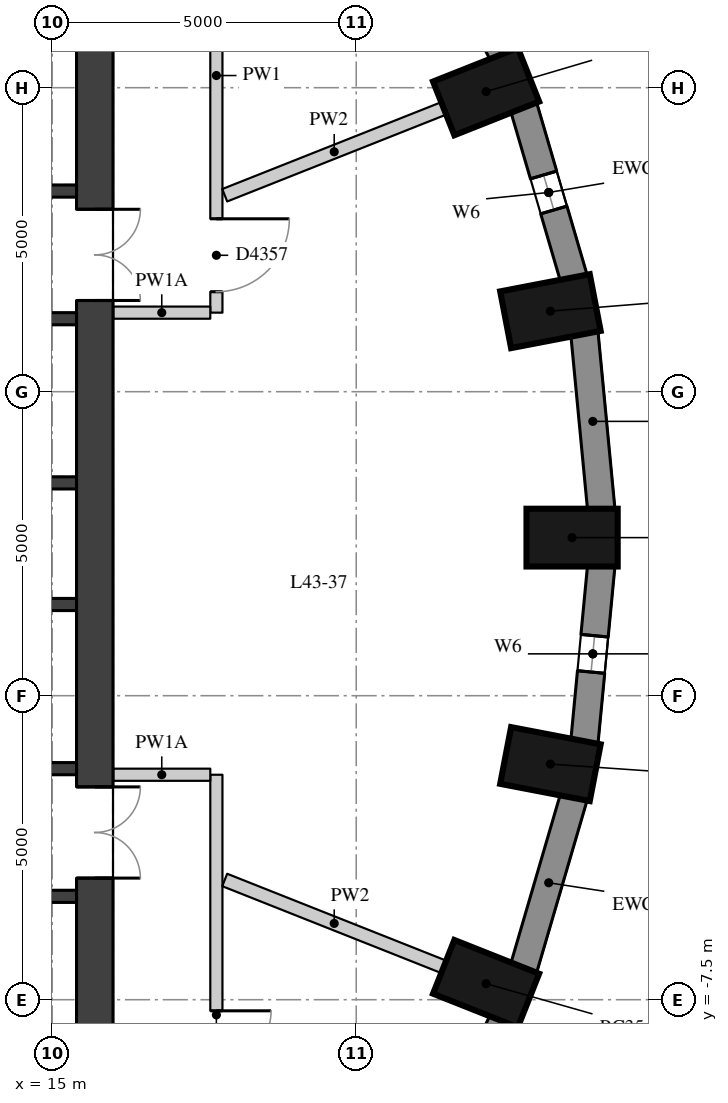
"""IFC4 building model, lengths in metres.
Left out: names, types, materials, properties, quantities, classifications, styles, units other than length and angle.
Written with IfcOpenShell. Run it as: python <this file> out.ifc"""

import sys

from ifc_helpers import new_model, si_unit, direction, frame, frame_2d, origin, origin_2d, place, context, subcontext, project, spatial, rectangle, extrude, element, fill, save


model = new_model("IFC4")
c1 = context("Model", 3, precision=1e-05, world=origin(), true_north=direction((0.0, 1.0)))
c2 = subcontext(c1, "Body", "Model", "MODEL_VIEW")
j1 = project(units=[si_unit("LENGTHUNIT", "METRE"), si_unit("PLANEANGLEUNIT", "RADIAN")], contexts=[c1])
p1 = place(None, origin())
s1 = spatial("IfcSite", under=j1, at=p1, CompositionType="ELEMENT")
p2 = place(p1, origin())
s2 = spatial("IfcBuilding", under=s1, at=p2, CompositionType="ELEMENT")
p3 = place(p2, frame((0.0, 0.0, 155.0)))
s3 = spatial("IfcBuildingStorey", under=s2, at=p3, CompositionType="ELEMENT", Elevation=155.0)
for number, where, z_axis, x_axis in (
    (1, (23.55, 0.1, 0.0), (0.0, 0.0, 1.0), (1.0, 0.0, 0.0)),
    (2, (23.194, 3.825, 0.0), (0.0, 0.0, 1.0), (0.982, 0.189, 0.0)),
    (3, (22.136, 7.436, 0.0), (0.0, 0.0, 1.0), (0.93, 0.369, 0.0)),
    (4, (22.136, -7.236, 0.0), (0.0, 0.0, 1.0), (0.93, -0.369, 0.0)),
    (5, (23.194, -3.625, 0.0), (0.0, 0.0, 1.0), (0.982, -0.189, 0.0)),
):
    element("IfcColumn", number, at=place(p3, frame(where, z_axis=z_axis, x_axis=x_axis)), inside=s3, PredefinedType="COLUMN", context=c2, shape_type="SweptSolid", body=[
        extrude(rectangle(XDim=1.5, YDim=0.95, at=origin_2d()), origin(), (0.0, 0.0, 1.0), 3.3),
    ])
p4 = place(p3, frame((24.031, 0.555, 0.0), z_axis=(0.0, 0.0, 1.0), x_axis=(-0.095265737322, 0.995451876935, 0.0)))
e6 = element("IfcWall", 6, at=p4, inside=s3, PredefinedType="SOLIDWALL", context=c2, shape_type="SweptSolid", body=[
    extrude(rectangle(XDim=2.927, YDim=0.45, at=frame_2d((1.463, 0.0))), origin(), (0.0, 0.0, 1.0), 3.02),
])
p5 = place(p3, frame((23.58, 4.362, 0.0), z_axis=(0.0, 0.0, 1.0), x_axis=(-0.281049481624, 0.959693278542, 0.0)))
e7 = element("IfcWall", 7, at=p5, inside=s3, PredefinedType="SOLIDWALL", context=c2, shape_type="SweptSolid", body=[
    extrude(rectangle(XDim=2.948, YDim=0.45, at=frame_2d((1.474, 0.0))), origin(), (0.0, 0.0, 1.0), 3.02),
])
p6 = place(p5, frame((1.174, 0.0, 0.4)))
e8 = element("IfcOpeningElement", 8, at=p6, cuts=e7, PredefinedType="OPENING", context=c2, shape_type="SweptSolid", body=[
    extrude(rectangle(XDim=0.6, YDim=1.75, at=frame_2d((0.3, 0.875))), frame((0.0, 0.235, 0.0), z_axis=(0.0, -1.0, 0.0), x_axis=(1.0, 0.0, 0.0)), (0.0, 0.0, 1.0), 0.47),
])
p7 = place(p3, frame((22.415, 8.037, 0.0), z_axis=(0.0, 0.0, 1.0), x_axis=(-0.454133999889, 0.890933392653, 0.0)))
e9 = element("IfcWall", 9, at=p7, inside=s3, PredefinedType="SOLIDWALL", context=c2, shape_type="SweptSolid", body=[
    extrude(rectangle(XDim=2.986, YDim=0.45, at=frame_2d((1.493, 0.0))), origin(), (0.0, 0.0, 1.0), 3.02),
])
p8 = place(p3, frame((21.059, -10.497, 0.0), z_axis=(0.0, 0.0, 1.0), x_axis=(0.454133999889, 0.890933392653, 0.0)))
e10 = element("IfcWall", 10, at=p8, inside=s3, PredefinedType="SOLIDWALL", context=c2, shape_type="SweptSolid", body=[
    extrude(rectangle(XDim=2.986, YDim=0.45, at=frame_2d((1.493, 0.0))), origin(), (0.0, 0.0, 1.0), 3.02),
])
p9 = place(p8, frame((1.193, 0.0, 0.4)))
e11 = element("IfcOpeningElement", 11, at=p9, cuts=e10, PredefinedType="OPENING", context=c2, shape_type="SweptSolid", body=[
    extrude(rectangle(XDim=0.6, YDim=1.75, at=frame_2d((0.3, 0.875))), frame((0.0, 0.235, 0.0), z_axis=(0.0, -1.0, 0.0), x_axis=(1.0, 0.0, 0.0)), (0.0, 0.0, 1.0), 0.47),
])
p10 = place(p3, frame((22.751, -6.991, 0.0), z_axis=(0.0, 0.0, 1.0), x_axis=(0.281049481624, 0.959693278542, 0.0)))
e12 = element("IfcWall", 12, at=p10, inside=s3, PredefinedType="SOLIDWALL", context=c2, shape_type="SweptSolid", body=[
    extrude(rectangle(XDim=2.948, YDim=0.45, at=frame_2d((1.474, 0.0))), origin(), (0.0, 0.0, 1.0), 3.02),
])
p11 = place(p3, frame((23.752, -3.269, 0.0), z_axis=(0.0, 0.0, 1.0), x_axis=(0.095257827044, 0.995452633924, 0.0)))
e13 = element("IfcWall", 13, at=p11, inside=s3, PredefinedType="SOLIDWALL", context=c2, shape_type="SweptSolid", body=[
    extrude(rectangle(XDim=2.927, YDim=0.45, at=frame_2d((1.463, 0.0))), origin(), (0.0, 0.0, 1.0), 3.02),
])
p12 = place(p11, frame((1.163, 0.0, 0.4)))
e14 = element("IfcOpeningElement", 14, at=p12, cuts=e13, PredefinedType="OPENING", context=c2, shape_type="SweptSolid", body=[
    extrude(rectangle(XDim=0.6, YDim=1.75, at=frame_2d((0.3, 0.875))), frame((0.0, 0.235, 0.0), z_axis=(0.0, -1.0, 0.0), x_axis=(1.0, 0.0, 0.0)), (0.0, 0.0, 1.0), 0.47),
])
p13 = place(p3, frame((15.7, -9.4, 0.0), z_axis=(0.0, 0.0, 1.0), x_axis=(0.0, 1.0, 0.0)))
e15 = element("IfcWall", 15, at=p13, inside=s3, PredefinedType="SHEAR", context=c2, shape_type="SweptSolid", body=[
    extrude(rectangle(XDim=18.8, YDim=0.6, at=frame_2d((9.4, 0.0))), origin(), (0.0, 0.0, 1.0), 3.02),
])
p14 = place(p13, frame((13.4, 0.0, 0.0)))
e16 = element("IfcOpeningElement", 16, at=p14, cuts=e15, PredefinedType="OPENING", context=c2, shape_type="SweptSolid", body=[
    extrude(rectangle(XDim=1.5, YDim=2.1, at=frame_2d((0.75, 1.05))), frame((0.0, 0.31, 0.0), z_axis=(0.0, -1.0, 0.0), x_axis=(1.0, 0.0, 0.0)), (0.0, 0.0, 1.0), 0.62),
])
p15 = place(p13, frame((3.9, 0.0, 0.0)))
e17 = element("IfcOpeningElement", 17, at=p15, cuts=e15, PredefinedType="OPENING", context=c2, shape_type="SweptSolid", body=[
    extrude(rectangle(XDim=1.5, YDim=2.1, at=frame_2d((0.75, 1.05))), frame((0.0, 0.31, 0.0), z_axis=(0.0, -1.0, 0.0), x_axis=(1.0, 0.0, 0.0)), (0.0, 0.0, 1.0), 0.62),
])
p16 = place(p3, frame((4.6, 5.8, 0.0), z_axis=(0.0, 0.0, 1.0), x_axis=(1.0, 0.0, 0.0)))
e18 = element("IfcWall", 18, at=p16, inside=s3, PredefinedType="SHEAR", context=c2, shape_type="SweptSolid", body=[
    extrude(rectangle(XDim=10.8, YDim=0.2, at=frame_2d((5.4, 0.0))), origin(), (0.0, 0.0, 1.0), 3.02),
])
p17 = place(p16, frame((7.05, 0.0, 0.0)))
e19 = element("IfcOpeningElement", 19, at=p17, cuts=e18, PredefinedType="OPENING", context=c2, shape_type="SweptSolid", body=[
    extrude(rectangle(XDim=1.1, YDim=2.1, at=frame_2d((0.55, 1.05))), frame((0.0, 0.11, 0.0), z_axis=(0.0, -1.0, 0.0), x_axis=(1.0, 0.0, 0.0)), (0.0, 0.0, 1.0), 0.22),
])
p18 = place(p16, frame((9.05, 0.0, 0.0)))
e20 = element("IfcOpeningElement", 20, at=p18, cuts=e18, PredefinedType="OPENING", context=c2, shape_type="SweptSolid", body=[
    extrude(rectangle(XDim=1.1, YDim=2.1, at=frame_2d((0.55, 1.05))), frame((0.0, 0.11, 0.0), z_axis=(0.0, -1.0, 0.0), x_axis=(1.0, 0.0, 0.0)), (0.0, 0.0, 1.0), 0.22),
])
p19 = place(p3, frame((4.6, 3.7, 0.0), z_axis=(0.0, 0.0, 1.0), x_axis=(1.0, 0.0, 0.0)))
e21 = element("IfcWall", 21, at=p19, inside=s3, PredefinedType="SHEAR", context=c2, shape_type="SweptSolid", body=[
    extrude(rectangle(XDim=10.8, YDim=0.2, at=frame_2d((5.4, 0.0))), origin(), (0.0, 0.0, 1.0), 3.02),
])
p20 = place(p19, frame((6.6, 0.0, 0.0)))
e22 = element("IfcOpeningElement", 22, at=p20, cuts=e21, PredefinedType="OPENING", context=c2, shape_type="SweptSolid", body=[
    extrude(rectangle(XDim=1.1, YDim=2.1, at=frame_2d((0.55, 1.05))), frame((0.0, 0.11, 0.0), z_axis=(0.0, -1.0, 0.0), x_axis=(1.0, 0.0, 0.0)), (0.0, 0.0, 1.0), 0.22),
])
p21 = place(p19, frame((8.9, 0.0, 0.0)))
e23 = element("IfcOpeningElement", 23, at=p21, cuts=e21, PredefinedType="OPENING", context=c2, shape_type="SweptSolid", body=[
    extrude(rectangle(XDim=1.1, YDim=2.1, at=frame_2d((0.55, 1.05))), frame((0.0, 0.11, 0.0), z_axis=(0.0, -1.0, 0.0), x_axis=(1.0, 0.0, 0.0)), (0.0, 0.0, 1.0), 0.22),
])
for number, where, z_axis, x_axis in (
    (24, (4.6, 1.0, 0.0), (0.0, 0.0, 1.0), (1.0, 0.0, 0.0)),
    (25, (4.6, -1.0, 0.0), (0.0, 0.0, 1.0), (1.0, 0.0, 0.0)),
):
    element("IfcWall", number, at=place(p3, frame(where, z_axis=z_axis, x_axis=x_axis)), inside=s3, PredefinedType="SHEAR", context=c2, shape_type="SweptSolid", body=[
        extrude(rectangle(XDim=10.8, YDim=0.2, at=frame_2d((5.4, 0.0))), origin(), (0.0, 0.0, 1.0), 3.02),
    ])
p22 = place(p3, frame((4.6, -3.7, 0.0), z_axis=(0.0, 0.0, 1.0), x_axis=(1.0, 0.0, 0.0)))
e26 = element("IfcWall", 26, at=p22, inside=s3, PredefinedType="SHEAR", context=c2, shape_type="SweptSolid", body=[
    extrude(rectangle(XDim=10.8, YDim=0.2, at=frame_2d((5.4, 0.0))), origin(), (0.0, 0.0, 1.0), 3.02),
])
p23 = place(p22, frame((6.6, 0.0, 0.0)))
e27 = element("IfcOpeningElement", 27, at=p23, cuts=e26, PredefinedType="OPENING", context=c2, shape_type="SweptSolid", body=[
    extrude(rectangle(XDim=1.1, YDim=2.1, at=frame_2d((0.55, 1.05))), frame((0.0, 0.11, 0.0), z_axis=(0.0, -1.0, 0.0), x_axis=(1.0, 0.0, 0.0)), (0.0, 0.0, 1.0), 0.22),
])
p24 = place(p22, frame((8.9, 0.0, 0.0)))
e28 = element("IfcOpeningElement", 28, at=p24, cuts=e26, PredefinedType="OPENING", context=c2, shape_type="SweptSolid", body=[
    extrude(rectangle(XDim=1.1, YDim=2.1, at=frame_2d((0.55, 1.05))), frame((0.0, 0.11, 0.0), z_axis=(0.0, -1.0, 0.0), x_axis=(1.0, 0.0, 0.0)), (0.0, 0.0, 1.0), 0.22),
])
p25 = place(p3, frame((4.6, -5.8, 0.0), z_axis=(0.0, 0.0, 1.0), x_axis=(1.0, 0.0, 0.0)))
e29 = element("IfcWall", 29, at=p25, inside=s3, PredefinedType="SHEAR", context=c2, shape_type="SweptSolid", body=[
    extrude(rectangle(XDim=10.8, YDim=0.2, at=frame_2d((5.4, 0.0))), origin(), (0.0, 0.0, 1.0), 3.02),
])
p26 = place(p3, frame((17.7, -3.8, 0.0), z_axis=(0.0, 0.0, 1.0), x_axis=(0.0, -1.0, 0.0)))
e30 = element("IfcWall", 30, at=p26, inside=s3, PredefinedType="PARTITIONING", context=c2, shape_type="SweptSolid", body=[
    extrude(rectangle(XDim=7.9, YDim=0.2, at=frame_2d((3.95, 0.0))), origin(), (0.0, 0.0, 1.0), 3.02),
])
p27 = place(p26, frame((3.883, 0.0, 0.0)))
e31 = element("IfcOpeningElement", 31, at=p27, cuts=e30, PredefinedType="OPENING", context=c2, shape_type="SweptSolid", body=[
    extrude(rectangle(XDim=1.8, YDim=2.1, at=frame_2d((0.9, 1.05))), frame((0.0, 0.11, 0.0), z_axis=(0.0, -1.0, 0.0), x_axis=(1.0, 0.0, 0.0)), (0.0, 0.0, 1.0), 0.22),
])
p28 = place(p3, frame((17.7, 11.6, 0.0), z_axis=(0.0, 0.0, 1.0), x_axis=(0.0, -1.0, 0.0)))
e32 = element("IfcWall", 32, at=p28, inside=s3, PredefinedType="PARTITIONING", context=c2, shape_type="SweptSolid", body=[
    extrude(rectangle(XDim=7.8, YDim=0.2, at=frame_2d((3.9, 0.0))), origin(), (0.0, 0.0, 1.0), 3.02),
])
p29 = place(p28, frame((6.256, 0.0, 0.0)))
e33 = element("IfcOpeningElement", 33, at=p29, cuts=e32, PredefinedType="OPENING", context=c2, shape_type="SweptSolid", body=[
    extrude(rectangle(XDim=1.2, YDim=2.1, at=frame_2d((0.6, 1.05))), frame((0.0, 0.11, 0.0), z_axis=(0.0, -1.0, 0.0), x_axis=(1.0, 0.0, 0.0)), (0.0, 0.0, 1.0), 0.22),
])
for number, where, z_axis, x_axis in (
    (34, (17.6, 3.8, 0.0), (0.0, 0.0, 1.0), (-1.0, 0.0, 0.0)),
    (35, (16.004, -3.8, 0.0), (0.0, 0.0, 1.0), (1.0, 0.0, 0.0)),
):
    element("IfcWall", number, at=place(p3, frame(where, z_axis=z_axis, x_axis=x_axis)), inside=s3, PredefinedType="PARTITIONING", context=c2, shape_type="SweptSolid", body=[
        extrude(rectangle(XDim=1.596, YDim=0.2, at=frame_2d((0.798, 0.0))), origin(), (0.0, 0.0, 1.0), 2.57),
    ])
for number, where, z_axis, x_axis in (
    (36, (21.439, 7.16, 0.0), (0.0, 0.0, 1.0), (-0.93, -0.369, 0.0)),
    (37, (21.439, -6.96, 0.0), (0.0, 0.0, 1.0), (-0.93, 0.369, 0.0)),
):
    element("IfcWall", number, at=place(p3, frame(where, z_axis=z_axis, x_axis=x_axis)), inside=s3, PredefinedType="PARTITIONING", context=c2, shape_type="SweptSolid", body=[
        extrude(rectangle(XDim=3.875, YDim=0.22, at=frame_2d((1.938, 0.0))), origin(), (0.0, 0.0, 1.0), 3.02),
    ])
p30 = place(p6, origin())
e38 = element("IfcWindow", 38, at=p30, inside=s3, PartitioningType="SINGLE_PANEL", PredefinedType="WINDOW", context=c2, shape_type="SweptSolid", body=[
    extrude(rectangle(XDim=0.6, YDim=1.75, at=frame_2d((0.3, 0.875))), frame((0.0, 0.035, 0.0), z_axis=(0.0, -1.0, 0.0), x_axis=(1.0, 0.0, 0.0)), (0.0, 0.0, 1.0), 0.06),
])
fill(e8, e38)
p31 = place(p12, origin())
e39 = element("IfcWindow", 39, at=p31, inside=s3, PartitioningType="SINGLE_PANEL", PredefinedType="WINDOW", context=c2, shape_type="SweptSolid", body=[
    extrude(rectangle(XDim=0.6, YDim=1.75, at=frame_2d((0.3, 0.875))), frame((0.0, 0.035, 0.0), z_axis=(0.0, -1.0, 0.0), x_axis=(1.0, 0.0, 0.0)), (0.0, 0.0, 1.0), 0.06),
])
fill(e14, e39)
p32 = place(p14, origin())
e40 = element("IfcDoor", 40, at=p32, inside=s3, OperationType="DOUBLE_DOOR_SINGLE_SWING", PredefinedType="DOOR", context=c2, shape_type="SweptSolid", body=[
    extrude(rectangle(XDim=1.5, YDim=2.1, at=frame_2d((0.75, 1.05))), frame((0.0, 0.025, 0.0), z_axis=(0.0, -1.0, 0.0), x_axis=(1.0, 0.0, 0.0)), (0.0, 0.0, 1.0), 0.05),
])
fill(e16, e40)
p33 = place(p15, origin())
e41 = element("IfcDoor", 41, at=p33, inside=s3, OperationType="DOUBLE_DOOR_SINGLE_SWING", PredefinedType="DOOR", context=c2, shape_type="SweptSolid", body=[
    extrude(rectangle(XDim=1.5, YDim=2.1, at=frame_2d((0.75, 1.05))), frame((0.0, 0.025, 0.0), z_axis=(0.0, -1.0, 0.0), x_axis=(1.0, 0.0, 0.0)), (0.0, 0.0, 1.0), 0.05),
])
fill(e17, e41)
p34 = place(p27, origin())
e42 = element("IfcDoor", 42, at=p34, inside=s3, OperationType="DOUBLE_DOOR_SINGLE_SWING", PredefinedType="DOOR", context=c2, shape_type="SweptSolid", body=[
    extrude(rectangle(XDim=1.8, YDim=2.1, at=frame_2d((0.9, 1.05))), frame((0.0, 0.025, 0.0), z_axis=(0.0, -1.0, 0.0), x_axis=(1.0, 0.0, 0.0)), (0.0, 0.0, 1.0), 0.05),
])
fill(e31, e42)
p35 = place(p29, origin())
e43 = element("IfcDoor", 43, at=p35, inside=s3, OperationType="SINGLE_SWING_LEFT", PredefinedType="DOOR", context=c2, shape_type="SweptSolid", body=[
    extrude(rectangle(XDim=1.2, YDim=2.1, at=frame_2d((0.6, 1.05))), frame((0.0, 0.025, 0.0), z_axis=(0.0, -1.0, 0.0), x_axis=(1.0, 0.0, 0.0)), (0.0, 0.0, 1.0), 0.05),
])
fill(e33, e43)
save(model, sys.argv[1])
